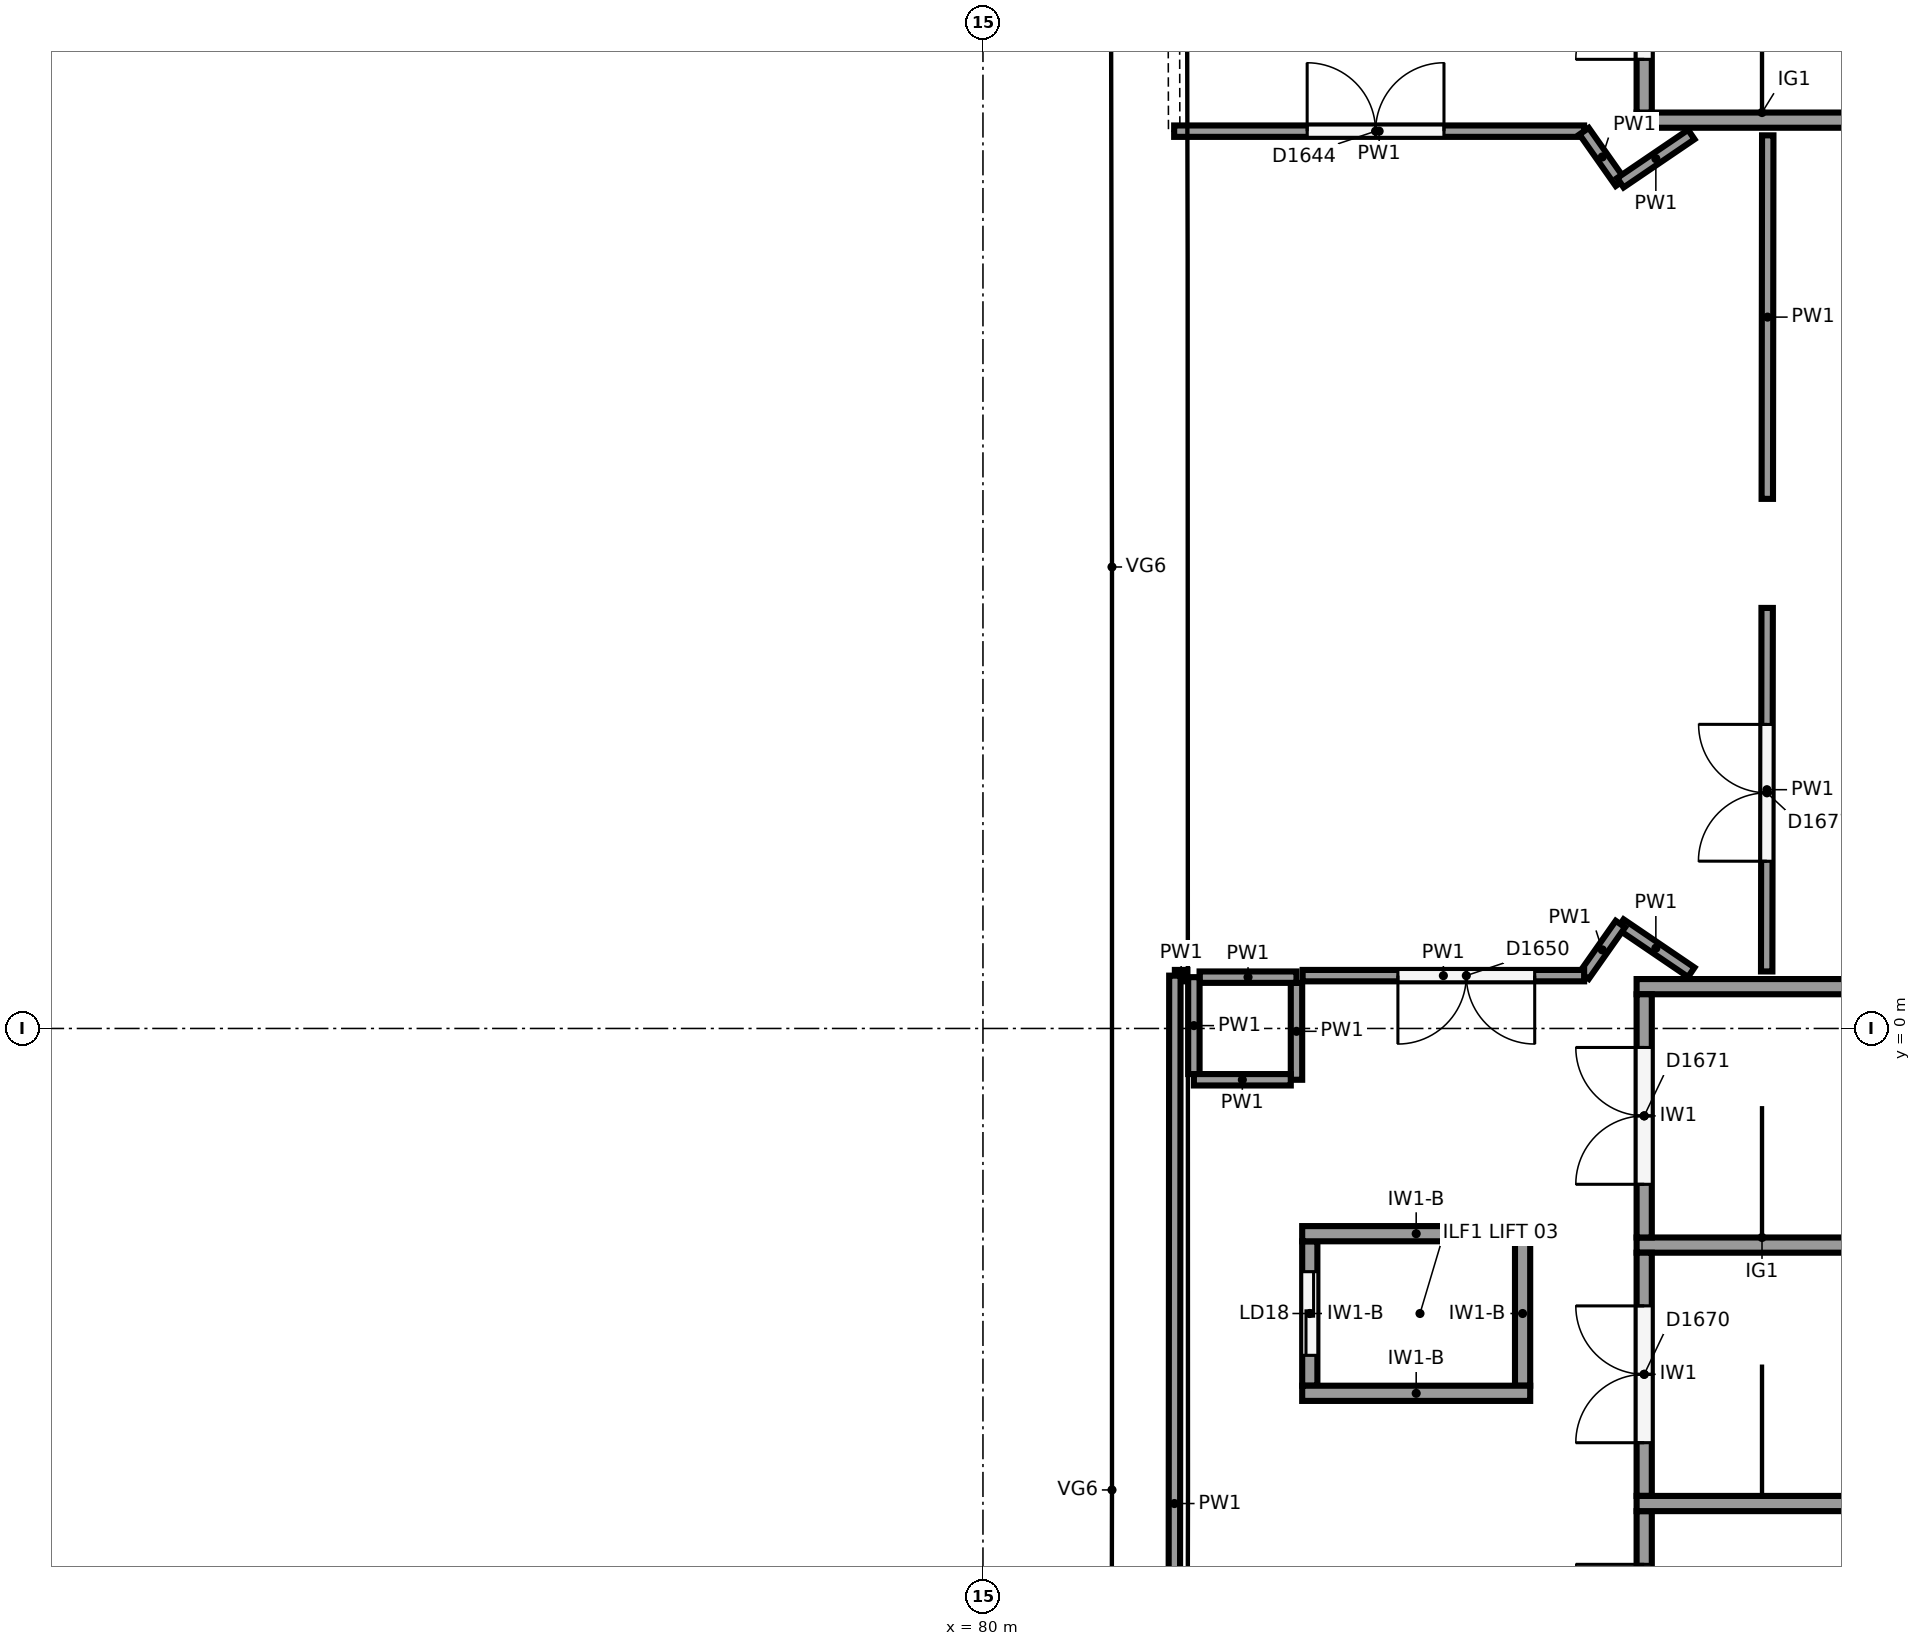
"""IFC4 building model, lengths in metres.
Left out: names, types, materials, properties, quantities, classifications, styles, units other than length and angle.
Written with IfcOpenShell. Run it as: python <this file> out.ifc"""

import sys

from ifc_helpers import new_model, si_unit, direction, frame, frame_2d, origin, origin_2d, place, context, subcontext, project, spatial, rectangle, circle, extrude, element, fill, save


model = new_model("IFC4")
c1 = context("Model", 3, precision=1e-05, world=origin(), true_north=direction((0.0, 1.0)))
c2 = subcontext(c1, "Body", "Model", "MODEL_VIEW")
j1 = project(units=[si_unit("LENGTHUNIT", "METRE"), si_unit("PLANEANGLEUNIT", "RADIAN")], contexts=[c1])
p1 = place(None, origin())
s1 = spatial("IfcSite", under=j1, at=p1, CompositionType="ELEMENT")
p2 = place(p1, origin())
s2 = spatial("IfcBuilding", under=s1, at=p2, CompositionType="ELEMENT")
p3 = place(p2, frame((0.0, 0.0, 24.0)))
s3 = spatial("IfcBuildingStorey", under=s2, at=p3, CompositionType="ELEMENT", Elevation=24.0)
p4 = place(p3, frame((84.998, -6.081, 0.0), z_axis=(0.0, 0.0, 1.0), x_axis=(1.0, 0.0, 0.0)))
e1 = element("IfcColumn", 1, at=p4, inside=s3, PredefinedType="COLUMN", context=c2, shape_type="SweptSolid", body=[
    extrude(circle(Radius=0.6, at=origin_2d()), origin(), (0.0, 0.0, 1.0), 6.0),
])
p5 = place(p3, frame((84.997, 6.137, 0.0), z_axis=(0.0, 0.0, 1.0), x_axis=(1.0, 0.0, 0.0)))
e2 = element("IfcColumn", 2, at=p5, inside=s3, PredefinedType="COLUMN", context=c2, shape_type="SweptSolid", body=[
    extrude(circle(Radius=0.5, at=origin_2d()), origin(), (0.0, 0.0, 1.0), 6.0),
])
for number, where, z_axis, x_axis in (
    (3, (97.6, -6.25, 0.0), (0.0, 0.0, 1.0), (-1.0, 0.0, 0.0)),
    (4, (97.6, 0.55, 0.0), (0.0, 0.0, 1.0), (-1.0, 0.0, 0.0)),
    (5, (97.6, -2.85, 0.0), (0.0, 0.0, 1.0), (-1.0, 0.0, 0.0)),
):
    element("IfcWall", number, at=place(p3, frame(where, z_axis=z_axis, x_axis=x_axis)), inside=s3, PredefinedType="SHEAR", context=c2, shape_type="SweptSolid", body=[
        extrude(rectangle(XDim=9.0, YDim=0.2, at=frame_2d((4.5, 0.0))), origin(), (0.0, 0.0, 1.0), 5.75),
    ])
p6 = place(p3, frame((88.7, -9.55, 0.0), z_axis=(0.0, 0.0, 1.0), x_axis=(0.0, 1.0, 0.0)))
e6 = element("IfcWall", 6, at=p6, inside=s3, PredefinedType="SHEAR", context=c2, shape_type="SweptSolid", body=[
    extrude(rectangle(XDim=3.2, YDim=0.2, at=frame_2d((1.6, 0.0))), origin(), (0.0, 0.0, 1.0), 5.75),
])
p7 = place(p6, frame((0.7, 0.0, 0.0)))
e7 = element("IfcOpeningElement", 7, at=p7, cuts=e6, PredefinedType="OPENING", context=c2, shape_type="SweptSolid", body=[
    extrude(rectangle(XDim=1.8, YDim=2.1, at=frame_2d((0.9, 1.05))), frame((0.0, 0.11, 0.0), z_axis=(0.0, -1.0, 0.0), x_axis=(1.0, 0.0, 0.0)), (0.0, 0.0, 1.0), 0.22),
])
p8 = place(p3, frame((88.7, -6.15, 0.0), z_axis=(0.0, 0.0, 1.0), x_axis=(0.0, 1.0, 0.0)))
e8 = element("IfcWall", 8, at=p8, inside=s3, PredefinedType="SHEAR", context=c2, shape_type="SweptSolid", body=[
    extrude(rectangle(XDim=3.2, YDim=0.2, at=frame_2d((1.6, 0.0))), origin(), (0.0, 0.0, 1.0), 5.75),
])
p9 = place(p8, frame((0.7, 0.0, 0.0)))
e9 = element("IfcOpeningElement", 9, at=p9, cuts=e8, PredefinedType="OPENING", context=c2, shape_type="SweptSolid", body=[
    extrude(rectangle(XDim=1.8, YDim=2.1, at=frame_2d((0.9, 1.05))), frame((0.0, 0.11, 0.0), z_axis=(0.0, -1.0, 0.0), x_axis=(1.0, 0.0, 0.0)), (0.0, 0.0, 1.0), 0.22),
])
p10 = place(p3, frame((88.7, -2.75, 0.0), z_axis=(0.0, 0.0, 1.0), x_axis=(0.0, 1.0, 0.0)))
e10 = element("IfcWall", 10, at=p10, inside=s3, PredefinedType="SHEAR", context=c2, shape_type="SweptSolid", body=[
    extrude(rectangle(XDim=3.2, YDim=0.2, at=frame_2d((1.6, 0.0))), origin(), (0.0, 0.0, 1.0), 5.75),
])
p11 = place(p10, frame((0.7, 0.0, 0.0)))
e11 = element("IfcOpeningElement", 11, at=p11, cuts=e10, PredefinedType="OPENING", context=c2, shape_type="SweptSolid", body=[
    extrude(rectangle(XDim=1.8, YDim=2.1, at=frame_2d((0.9, 1.05))), frame((0.0, 0.11, 0.0), z_axis=(0.0, -1.0, 0.0), x_axis=(1.0, 0.0, 0.0)), (0.0, 0.0, 1.0), 0.22),
])
for number, where, z_axis, x_axis in (
    (12, (87.2, -4.8, 0.0), (0.0, 0.0, 1.0), (-1.0, 0.0, 0.0)),
    (13, (87.2, -2.7, 0.0), (0.0, 0.0, 1.0), (-1.0, 0.0, 0.0)),
):
    element("IfcWall", number, at=place(p3, frame(where, z_axis=z_axis, x_axis=x_axis)), inside=s3, PredefinedType="SHEAR", context=c2, shape_type="SweptSolid", body=[
        extrude(rectangle(XDim=3.0, YDim=0.2, at=frame_2d((1.5, 0.0))), origin(), (0.0, 0.0, 1.0), 4.6),
    ])
p12 = place(p3, frame((87.1, -4.7, 0.0), z_axis=(0.0, 0.0, 1.0), x_axis=(0.0, 1.0, 0.0)))
e14 = element("IfcWall", 14, at=p12, inside=s3, PredefinedType="SHEAR", context=c2, shape_type="SweptSolid", body=[
    extrude(rectangle(XDim=1.9, YDim=0.2, at=frame_2d((0.95, 0.0))), origin(), (0.0, 0.0, 1.0), 4.6),
])
p13 = place(p3, frame((84.3, -4.7, 0.0), z_axis=(0.0, 0.0, 1.0), x_axis=(0.0, 1.0, 0.0)))
e15 = element("IfcWall", 15, at=p13, inside=s3, PredefinedType="SHEAR", context=c2, shape_type="SweptSolid", body=[
    extrude(rectangle(XDim=1.9, YDim=0.2, at=frame_2d((0.95, 0.0))), origin(), (0.0, 0.0, 1.0), 4.6),
])
p14 = place(p13, frame((0.4, 0.0, 0.0)))
e16 = element("IfcOpeningElement", 16, at=p14, cuts=e15, PredefinedType="OPENING", context=c2, shape_type="SweptSolid", body=[
    extrude(rectangle(XDim=1.1, YDim=2.1, at=frame_2d((0.55, 1.05))), frame((0.0, 0.11, 0.0), z_axis=(0.0, -1.0, 0.0), x_axis=(1.0, 0.0, 0.0)), (0.0, 0.0, 1.0), 0.22),
])
p15 = place(p3, frame((97.6, 11.95, 0.0), z_axis=(0.0, 0.0, 1.0), x_axis=(-1.0, 0.0, 0.0)))
e17 = element("IfcWall", 17, at=p15, inside=s3, PredefinedType="SHEAR", context=c2, shape_type="SweptSolid", body=[
    extrude(rectangle(XDim=9.0, YDim=0.2, at=frame_2d((4.5, 0.0))), origin(), (0.0, 0.0, 1.0), 5.75),
])
p16 = place(p3, frame((88.7, 12.05, 0.0), z_axis=(0.0, 0.0, 1.0), x_axis=(0.0, 1.0, 0.0)))
e18 = element("IfcWall", 18, at=p16, inside=s3, PredefinedType="SHEAR", context=c2, shape_type="SweptSolid", body=[
    extrude(rectangle(XDim=3.2, YDim=0.2, at=frame_2d((1.6, 0.0))), origin(), (0.0, 0.0, 1.0), 5.75),
])
p17 = place(p16, frame((0.7, 0.0, 0.0)))
e19 = element("IfcOpeningElement", 19, at=p17, cuts=e18, PredefinedType="OPENING", context=c2, shape_type="SweptSolid", body=[
    extrude(rectangle(XDim=1.8, YDim=2.1, at=frame_2d((0.9, 1.05))), frame((0.0, 0.11, 0.0), z_axis=(0.0, -1.0, 0.0), x_axis=(1.0, 0.0, 0.0)), (0.0, 0.0, 1.0), 0.22),
])
p18 = place(p3, frame((90.312, 0.75, 0.0), z_axis=(0.0, 0.0, 1.0), x_axis=(0.001276160268, 0.999999185707, 0.0)))
e20 = element("IfcWall", 20, at=p18, inside=s3, PredefinedType="PARTITIONING", context=c2, shape_type="SweptSolid", body=[
    extrude(rectangle(XDim=4.783, YDim=0.15, at=frame_2d((2.391, 0.0))), origin(), (0.0, 0.0, 1.0), 5.4),
])
p19 = place(p18, frame((1.45, 0.0, 0.0)))
e21 = element("IfcOpeningElement", 21, at=p19, cuts=e20, PredefinedType="OPENING", context=c2, shape_type="SweptSolid", body=[
    extrude(rectangle(XDim=1.8, YDim=2.1, at=frame_2d((0.9, 1.05))), frame((0.0, 0.085, 0.0), z_axis=(0.0, -1.0, 0.0), x_axis=(1.0, 0.0, 0.0)), (0.0, 0.0, 1.0), 0.17),
])
p20 = place(p3, frame((90.32, 6.967, 0.0), z_axis=(0.0, 0.0, 1.0), x_axis=(0.001225113935, 0.999999249548, 0.0)))
e22 = element("IfcWall", 22, at=p20, inside=s3, PredefinedType="PARTITIONING", context=c2, shape_type="SweptSolid", body=[
    extrude(rectangle(XDim=4.783, YDim=0.15, at=frame_2d((2.391, 0.0))), origin(), (0.0, 0.0, 1.0), 5.4),
])
p21 = place(p3, frame((84.125, -0.675, 0.0), z_axis=(0.0, 0.0, 1.0), x_axis=(0.0, 1.0, 0.0)))
e23 = element("IfcWall", 23, at=p21, inside=s3, PredefinedType="PARTITIONING", context=c2, shape_type="SweptSolid", body=[
    extrude(rectangle(XDim=1.275, YDim=0.15, at=frame_2d((0.638, 0.0))), origin(), (0.0, 0.0, 1.0), 5.4),
])
p22 = place(p3, frame((84.125, 0.675, 0.0), z_axis=(0.0, 0.0, 1.0), x_axis=(-1.0, 0.0, 0.0)))
e24 = element("IfcWall", 24, at=p22, inside=s3, PredefinedType="PARTITIONING", context=c2, shape_type="SweptSolid", body=[
    extrude(rectangle(XDim=1.275, YDim=0.15, at=frame_2d((0.637, 0.0))), origin(), (0.0, 0.0, 1.0), 5.4),
])
for number, where, z_axis, x_axis in (
    (25, (82.775, 0.675, 0.0), (0.0, 0.0, 1.0), (0.0, -1.0, 0.0)),
    (26, (82.775, -0.675, 0.0), (0.0, 0.0, 1.0), (1.0, 0.0, 0.0)),
):
    element("IfcWall", number, at=place(p3, frame(where, z_axis=z_axis, x_axis=x_axis)), inside=s3, PredefinedType="PARTITIONING", context=c2, shape_type="SweptSolid", body=[
        extrude(rectangle(XDim=1.275, YDim=0.15, at=frame_2d((0.638, 0.0))), origin(), (0.0, 0.0, 1.0), 5.4),
    ])
p23 = place(p3, frame((82.69, 0.695, 0.0), z_axis=(0.0, 0.0, 1.0), x_axis=(-1.0, 0.0, 0.0)))
e27 = element("IfcWall", 27, at=p23, inside=s3, PredefinedType="PARTITIONING", context=c2, shape_type="SweptSolid", body=[
    extrude(rectangle(XDim=0.165, YDim=0.15, at=frame_2d((0.083, 0.0))), origin(), (0.0, 0.0, 1.0), 5.4),
])
p24 = place(p3, frame((82.525, 0.695, 0.0), z_axis=(0.0, 0.0, 1.0), x_axis=(-0.000843673901, -0.999999644107, 0.0)))
e28 = element("IfcWall", 28, at=p24, inside=s3, PredefinedType="PARTITIONING", context=c2, shape_type="SweptSolid", body=[
    extrude(rectangle(XDim=13.89, YDim=0.15, at=frame_2d((6.945, 0.0))), origin(), (0.0, 0.0, 1.0), 5.4),
])
p25 = place(p3, frame((89.32, 0.74, 0.0), z_axis=(0.0, 0.0, 1.0), x_axis=(-0.827055308354, 0.562120553728, 0.0)))
e29 = element("IfcWall", 29, at=p25, inside=s3, PredefinedType="PARTITIONING", context=c2, shape_type="SweptSolid", body=[
    extrude(rectangle(XDim=1.128, YDim=0.15, at=frame_2d((0.564, 0.0))), origin(), (0.0, 0.0, 1.0), 5.4),
])
p26 = place(p3, frame((88.387, 1.374, 0.0), z_axis=(0.0, 0.0, 1.0), x_axis=(-0.575376756214, -0.817888493872, 0.0)))
e30 = element("IfcWall", 30, at=p26, inside=s3, PredefinedType="PARTITIONING", context=c2, shape_type="SweptSolid", body=[
    extrude(rectangle(XDim=0.83, YDim=0.15, at=frame_2d((0.415, 0.0))), origin(), (0.0, 0.0, 1.0), 5.4),
])
p27 = place(p3, frame((87.909, 0.695, 0.0), z_axis=(0.0, 0.0, 1.0), x_axis=(-1.0, 0.0, 0.0)))
e31 = element("IfcWall", 31, at=p27, inside=s3, PredefinedType="PARTITIONING", context=c2, shape_type="SweptSolid", body=[
    extrude(rectangle(XDim=3.704, YDim=0.15, at=frame_2d((1.852, 0.0))), origin(), (0.0, 0.0, 1.0), 5.4),
])
p28 = place(p27, frame((0.65, 0.0, 0.0)))
e32 = element("IfcOpeningElement", 32, at=p28, cuts=e31, PredefinedType="OPENING", context=c2, shape_type="SweptSolid", body=[
    extrude(rectangle(XDim=1.8, YDim=2.1, at=frame_2d((0.9, 1.05))), frame((0.0, 0.085, 0.0), z_axis=(0.0, -1.0, 0.0), x_axis=(1.0, 0.0, 0.0)), (0.0, 0.0, 1.0), 0.17),
])
p29 = place(p3, frame((82.48, 25.695, 0.0), z_axis=(0.0, 0.0, 1.0), x_axis=(0.002531014497, -0.999996796978, 0.0)))
e33 = element("IfcWall", 33, at=p29, inside=s3, PredefinedType="PARTITIONING", context=c2, shape_type="SweptSolid", body=[
    extrude(rectangle(XDim=13.89, YDim=0.15, at=frame_2d((6.945, 0.0))), origin(), (0.0, 0.0, 1.0), 5.4),
])
p30 = place(p3, frame((82.516, 11.805, 0.0), z_axis=(0.0, 0.0, 1.0), x_axis=(1.0, 0.0, 0.0)))
e34 = element("IfcWall", 34, at=p30, inside=s3, PredefinedType="PARTITIONING", context=c2, shape_type="SweptSolid", body=[
    extrude(rectangle(XDim=5.394, YDim=0.15, at=frame_2d((2.697, 0.0))), origin(), (0.0, 0.0, 1.0), 5.4),
])
p31 = place(p30, frame((1.75, 0.0, 0.0)))
e35 = element("IfcOpeningElement", 35, at=p31, cuts=e34, PredefinedType="OPENING", context=c2, shape_type="SweptSolid", body=[
    extrude(rectangle(XDim=1.8, YDim=2.1, at=frame_2d((0.9, 1.05))), frame((0.0, 0.085, 0.0), z_axis=(0.0, -1.0, 0.0), x_axis=(1.0, 0.0, 0.0)), (0.0, 0.0, 1.0), 0.17),
])
p32 = place(p3, frame((87.909, 11.805, 0.0), z_axis=(0.0, 0.0, 1.0), x_axis=(0.575573582652, -0.81774999294, 0.0)))
e36 = element("IfcWall", 36, at=p32, inside=s3, PredefinedType="PARTITIONING", context=c2, shape_type="SweptSolid", body=[
    extrude(rectangle(XDim=0.83, YDim=0.15, at=frame_2d((0.415, 0.0))), origin(), (0.0, 0.0, 1.0), 5.4),
])
p33 = place(p3, frame((88.387, 11.126, 0.0), z_axis=(0.0, 0.0, 1.0), x_axis=(0.827055308354, 0.562120553728, 0.0)))
e37 = element("IfcWall", 37, at=p33, inside=s3, PredefinedType="PARTITIONING", context=c2, shape_type="SweptSolid", body=[
    extrude(rectangle(XDim=1.128, YDim=0.15, at=frame_2d((0.564, 0.0))), origin(), (0.0, 0.0, 1.0), 5.4),
])
p34 = place(p7, origin())
e38 = element("IfcDoor", 38, at=p34, inside=s3, OperationType="DOUBLE_DOOR_SINGLE_SWING", PredefinedType="DOOR", context=c2, shape_type="SweptSolid", body=[
    extrude(rectangle(XDim=1.8, YDim=2.1, at=frame_2d((0.9, 1.05))), frame((0.0, 0.025, 0.0), z_axis=(0.0, -1.0, 0.0), x_axis=(1.0, 0.0, 0.0)), (0.0, 0.0, 1.0), 0.05),
])
fill(e7, e38)
p35 = place(p9, origin())
e39 = element("IfcDoor", 39, at=p35, inside=s3, OperationType="DOUBLE_DOOR_SINGLE_SWING", PredefinedType="DOOR", context=c2, shape_type="SweptSolid", body=[
    extrude(rectangle(XDim=1.8, YDim=2.1, at=frame_2d((0.9, 1.05))), frame((0.0, 0.025, 0.0), z_axis=(0.0, -1.0, 0.0), x_axis=(1.0, 0.0, 0.0)), (0.0, 0.0, 1.0), 0.05),
])
fill(e9, e39)
p36 = place(p11, origin())
e40 = element("IfcDoor", 40, at=p36, inside=s3, OperationType="DOUBLE_DOOR_SINGLE_SWING", PredefinedType="DOOR", context=c2, shape_type="SweptSolid", body=[
    extrude(rectangle(XDim=1.8, YDim=2.1, at=frame_2d((0.9, 1.05))), frame((0.0, 0.025, 0.0), z_axis=(0.0, -1.0, 0.0), x_axis=(1.0, 0.0, 0.0)), (0.0, 0.0, 1.0), 0.05),
])
fill(e11, e40)
p37 = place(p14, origin())
e41 = element("IfcDoor", 41, at=p37, inside=s3, OperationType="SLIDING_TO_RIGHT", PredefinedType="DOOR", context=c2, shape_type="SweptSolid", body=[
    extrude(rectangle(XDim=1.1, YDim=2.1, at=frame_2d((0.55, 1.05))), frame((0.0, 0.025, 0.0), z_axis=(0.0, -1.0, 0.0), x_axis=(1.0, 0.0, 0.0)), (0.0, 0.0, 1.0), 0.05),
])
fill(e16, e41)
p38 = place(p17, origin())
e42 = element("IfcDoor", 42, at=p38, inside=s3, OperationType="DOUBLE_DOOR_SINGLE_SWING", PredefinedType="DOOR", context=c2, shape_type="SweptSolid", body=[
    extrude(rectangle(XDim=1.8, YDim=2.1, at=frame_2d((0.9, 1.05))), frame((0.0, 0.025, 0.0), z_axis=(0.0, -1.0, 0.0), x_axis=(1.0, 0.0, 0.0)), (0.0, 0.0, 1.0), 0.05),
])
fill(e19, e42)
p39 = place(p19, origin())
e43 = element("IfcDoor", 43, at=p39, inside=s3, OperationType="DOUBLE_DOOR_SINGLE_SWING", PredefinedType="DOOR", context=c2, shape_type="SweptSolid", body=[
    extrude(rectangle(XDim=1.8, YDim=2.1, at=frame_2d((0.9, 1.05))), frame((0.0, 0.025, 0.0), z_axis=(0.0, -1.0, 0.0), x_axis=(1.0, 0.0, 0.0)), (0.0, 0.0, 1.0), 0.05),
])
fill(e21, e43)
p40 = place(p28, origin())
e44 = element("IfcDoor", 44, at=p40, inside=s3, OperationType="DOUBLE_DOOR_SINGLE_SWING", PredefinedType="DOOR", context=c2, shape_type="SweptSolid", body=[
    extrude(rectangle(XDim=1.8, YDim=2.1, at=frame_2d((0.9, 1.05))), frame((0.0, 0.025, 0.0), z_axis=(0.0, -1.0, 0.0), x_axis=(1.0, 0.0, 0.0)), (0.0, 0.0, 1.0), 0.05),
])
fill(e32, e44)
p41 = place(p31, origin())
e45 = element("IfcDoor", 45, at=p41, inside=s3, OperationType="DOUBLE_DOOR_SINGLE_SWING", PredefinedType="DOOR", context=c2, shape_type="SweptSolid", body=[
    extrude(rectangle(XDim=1.8, YDim=2.1, at=frame_2d((0.9, 1.05))), frame((0.0, 0.025, 0.0), z_axis=(0.0, -1.0, 0.0), x_axis=(1.0, 0.0, 0.0)), (0.0, 0.0, 1.0), 0.05),
])
fill(e35, e45)
save(model, sys.argv[1])
